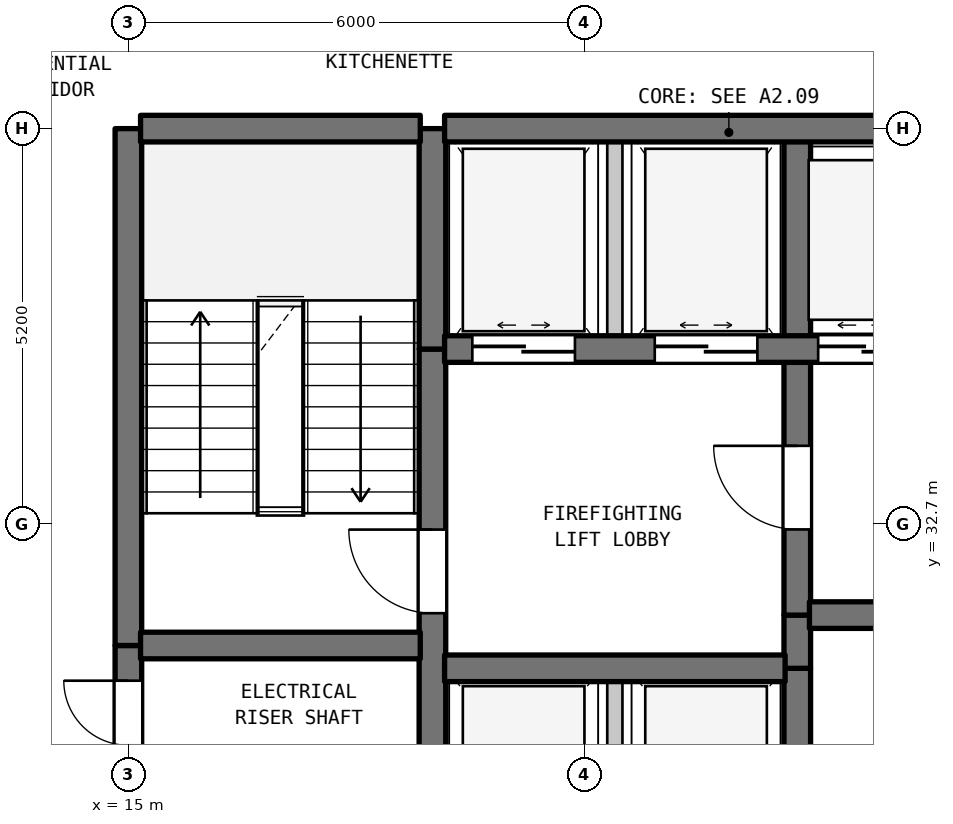
"""IFC4 building model, lengths in metres.
Left out: names, types, materials, properties, quantities, classifications, styles, units other than length and angle.
Written with IfcOpenShell. Run it as: python <this file> out.ifc"""

import sys

from ifc_helpers import new_model, si_unit, direction, frame, frame_2d, origin, place, context, subcontext, project, spatial, rectangle, extrude, element, fill, save


model = new_model("IFC4")
c1 = context("Model", 3, precision=1e-05, world=origin(), true_north=direction((0.0, 1.0)))
c2 = subcontext(c1, "Body", "Model", "MODEL_VIEW")
j1 = project(units=[si_unit("LENGTHUNIT", "METRE"), si_unit("PLANEANGLEUNIT", "RADIAN")], contexts=[c1])
p1 = place(None, origin())
s1 = spatial("IfcSite", under=j1, at=p1, CompositionType="ELEMENT")
p2 = place(p1, origin())
s2 = spatial("IfcBuilding", under=s1, at=p2, CompositionType="ELEMENT")
p3 = place(p2, frame((0.0, 0.0, 90.9)))
s3 = spatial("IfcBuildingStorey", under=s2, at=p3, CompositionType="ELEMENT", Elevation=90.9)
p4 = place(p3, frame((15.0, 29.5, 0.0), z_axis=(0.0, 0.0, 1.0), x_axis=(0.0, 1.0, 0.0)))
e1 = element("IfcWall", 1, at=p4, inside=s3, PredefinedType="SHEAR", context=c2, shape_type="SweptSolid", body=[
    extrude(rectangle(XDim=1.6, YDim=0.35, at=frame_2d((0.8, 0.0))), origin(), (0.0, 0.0, 1.0), 3.385),
])
p5 = place(p4, frame((0.287, 0.0, 0.0)))
e2 = element("IfcOpeningElement", 2, at=p5, cuts=e1, PredefinedType="OPENING", context=c2, shape_type="SweptSolid", body=[
    extrude(rectangle(XDim=0.85, YDim=2.1, at=frame_2d((0.425, 1.05))), frame((0.0, 0.185, 0.0), z_axis=(0.0, -1.0, 0.0), x_axis=(1.0, 0.0, 0.0)), (0.0, 0.0, 1.0), 0.37),
])
p6 = place(p3, frame((15.0, 31.1, 0.0), z_axis=(0.0, 0.0, 1.0), x_axis=(0.0, 1.0, 0.0)))
e3 = element("IfcWall", 3, at=p6, inside=s3, PredefinedType="SHEAR", context=c2, shape_type="SweptSolid", body=[
    extrude(rectangle(XDim=6.8, YDim=0.35, at=frame_2d((3.4, 0.0))), origin(), (0.0, 0.0, 1.0), 3.385),
])
p7 = place(p3, frame((19.0, 29.5, 0.0), z_axis=(0.0, 0.0, 1.0), x_axis=(0.0, 1.0, 0.0)))
e4 = element("IfcWall", 4, at=p7, inside=s3, PredefinedType="SHEAR", context=c2, shape_type="SweptSolid", body=[
    extrude(rectangle(XDim=5.5, YDim=0.35, at=frame_2d((2.75, 0.0))), origin(), (0.0, 0.0, 1.0), 3.385),
])
p8 = place(p7, frame((2.025, 0.0, 0.0)))
e5 = element("IfcOpeningElement", 5, at=p8, cuts=e4, PredefinedType="OPENING", context=c2, shape_type="SweptSolid", body=[
    extrude(rectangle(XDim=1.1, YDim=2.15, at=frame_2d((0.55, 1.075))), frame((0.0, 0.185, 0.0), z_axis=(0.0, -1.0, 0.0), x_axis=(1.0, 0.0, 0.0)), (0.0, 0.0, 1.0), 0.37),
])
p9 = place(p3, frame((19.0, 35.0, 0.0), z_axis=(0.0, 0.0, 1.0), x_axis=(0.0, 1.0, 0.0)))
e6 = element("IfcWall", 6, at=p9, inside=s3, PredefinedType="SHEAR", context=c2, shape_type="SweptSolid", body=[
    extrude(rectangle(XDim=2.9, YDim=0.35, at=frame_2d((1.45, 0.0))), origin(), (0.0, 0.0, 1.0), 3.385),
])
p10 = place(p3, frame((21.4, 28.2, 0.0), z_axis=(0.0, 0.0, 1.0), x_axis=(0.0, 1.0, 0.0)))
e7 = element("IfcWall", 7, at=p10, inside=s3, PredefinedType="STANDARD", context=c2, shape_type="SweptSolid", body=[
    extrude(rectangle(XDim=2.6, YDim=0.2, at=frame_2d((1.3, 0.0))), origin(), (0.0, 0.0, 1.0), 3.385),
])
p11 = place(p3, frame((21.4, 35.0, 0.0), z_axis=(0.0, 0.0, 1.0), x_axis=(0.0, 1.0, 0.0)))
e8 = element("IfcWall", 8, at=p11, inside=s3, PredefinedType="STANDARD", context=c2, shape_type="SweptSolid", body=[
    extrude(rectangle(XDim=2.9, YDim=0.2, at=frame_2d((1.45, 0.0))), origin(), (0.0, 0.0, 1.0), 3.385),
])
p12 = place(p3, frame((23.8, 29.5, 0.0), z_axis=(0.0, 0.0, 1.0), x_axis=(0.0, 1.0, 0.0)))
e9 = element("IfcWall", 9, at=p12, inside=s3, PredefinedType="SHEAR", context=c2, shape_type="SweptSolid", body=[
    extrude(rectangle(XDim=1.3, YDim=0.35, at=frame_2d((0.65, 0.0))), origin(), (0.0, 0.0, 1.0), 3.385),
])
p13 = place(p3, frame((23.8, 30.8, 0.0), z_axis=(0.0, 0.0, 1.0), x_axis=(0.0, 1.0, 0.0)))
e10 = element("IfcWall", 10, at=p13, inside=s3, PredefinedType="SHEAR", context=c2, shape_type="SweptSolid", body=[
    extrude(rectangle(XDim=0.7, YDim=0.35, at=frame_2d((0.35, 0.0))), origin(), (0.0, 0.0, 1.0), 3.385),
])
p14 = place(p3, frame((23.8, 31.5, 0.0), z_axis=(0.0, 0.0, 1.0), x_axis=(0.0, 1.0, 0.0)))
e11 = element("IfcWall", 11, at=p14, inside=s3, PredefinedType="SHEAR", context=c2, shape_type="SweptSolid", body=[
    extrude(rectangle(XDim=3.5, YDim=0.35, at=frame_2d((1.75, 0.0))), origin(), (0.0, 0.0, 1.0), 3.385),
])
p15 = place(p14, frame((1.127, 0.0, 0.0)))
e12 = element("IfcOpeningElement", 12, at=p15, cuts=e11, PredefinedType="OPENING", context=c2, shape_type="SweptSolid", body=[
    extrude(rectangle(XDim=1.1, YDim=2.15, at=frame_2d((0.55, 1.075))), frame((0.0, 0.185, 0.0), z_axis=(0.0, -1.0, 0.0), x_axis=(1.0, 0.0, 0.0)), (0.0, 0.0, 1.0), 0.37),
])
p16 = place(p3, frame((23.8, 35.0, 0.0), z_axis=(0.0, 0.0, 1.0), x_axis=(0.0, 1.0, 0.0)))
e13 = element("IfcWall", 13, at=p16, inside=s3, PredefinedType="SHEAR", context=c2, shape_type="SweptSolid", body=[
    extrude(rectangle(XDim=2.9, YDim=0.35, at=frame_2d((1.45, 0.0))), origin(), (0.0, 0.0, 1.0), 3.385),
])
p17 = place(p3, frame((19.16, 30.8, 0.0), z_axis=(0.0, 0.0, 1.0), x_axis=(1.0, 0.0, 0.0)))
e14 = element("IfcWall", 14, at=p17, inside=s3, PredefinedType="SHEAR", context=c2, shape_type="SweptSolid", body=[
    extrude(rectangle(XDim=4.48, YDim=0.35, at=frame_2d((2.24, 0.0))), origin(), (0.0, 0.0, 1.0), 3.385),
])
p18 = place(p3, frame((15.16, 31.1, 0.0), z_axis=(0.0, 0.0, 1.0), x_axis=(1.0, 0.0, 0.0)))
e15 = element("IfcWall", 15, at=p18, inside=s3, PredefinedType="SHEAR", context=c2, shape_type="SweptSolid", body=[
    extrude(rectangle(XDim=3.68, YDim=0.35, at=frame_2d((1.84, 0.0))), origin(), (0.0, 0.0, 1.0), 3.385),
])
p19 = place(p3, frame((23.96, 31.5, 0.0), z_axis=(0.0, 0.0, 1.0), x_axis=(1.0, 0.0, 0.0)))
e16 = element("IfcWall", 16, at=p19, inside=s3, PredefinedType="SHEAR", context=c2, shape_type="SweptSolid", body=[
    extrude(rectangle(XDim=3.18, YDim=0.35, at=frame_2d((1.59, 0.0))), origin(), (0.0, 0.0, 1.0), 3.385),
])
p20 = place(p19, frame((1.094, 0.0, 0.0)))
e17 = element("IfcOpeningElement", 17, at=p20, cuts=e16, PredefinedType="OPENING", context=c2, shape_type="SweptSolid", body=[
    extrude(rectangle(XDim=0.85, YDim=2.1, at=frame_2d((0.425, 1.05))), frame((0.0, 0.185, 0.0), z_axis=(0.0, -1.0, 0.0), x_axis=(1.0, 0.0, 0.0)), (0.0, 0.0, 1.0), 0.37),
])
p21 = place(p3, frame((19.16, 35.0, 0.0), z_axis=(0.0, 0.0, 1.0), x_axis=(1.0, 0.0, 0.0)))
e18 = element("IfcWall", 18, at=p21, inside=s3, PredefinedType="SHEAR", context=c2, shape_type="SweptSolid", body=[
    extrude(rectangle(XDim=11.48, YDim=0.35, at=frame_2d((5.74, 0.0))), origin(), (0.0, 0.0, 1.0), 3.385),
])
p22 = place(p21, frame((0.365, 0.0, 0.0)))
e19 = element("IfcOpeningElement", 19, at=p22, cuts=e18, PredefinedType="OPENING", context=c2, shape_type="SweptSolid", body=[
    extrude(rectangle(XDim=1.35, YDim=2.2, at=frame_2d((0.675, 1.1))), frame((0.0, 0.185, 0.0), z_axis=(0.0, -1.0, 0.0), x_axis=(1.0, 0.0, 0.0)), (0.0, 0.0, 1.0), 0.37),
])
p23 = place(p21, frame((2.765, 0.0, 0.0)))
e20 = element("IfcOpeningElement", 20, at=p23, cuts=e18, PredefinedType="OPENING", context=c2, shape_type="SweptSolid", body=[
    extrude(rectangle(XDim=1.35, YDim=2.2, at=frame_2d((0.675, 1.1))), frame((0.0, 0.185, 0.0), z_axis=(0.0, -1.0, 0.0), x_axis=(1.0, 0.0, 0.0)), (0.0, 0.0, 1.0), 0.37),
])
p24 = place(p21, frame((4.915, 0.0, 0.0)))
e21 = element("IfcOpeningElement", 21, at=p24, cuts=e18, PredefinedType="OPENING", context=c2, shape_type="SweptSolid", body=[
    extrude(rectangle(XDim=1.2, YDim=2.2, at=frame_2d((0.6, 1.1))), frame((0.0, 0.185, 0.0), z_axis=(0.0, -1.0, 0.0), x_axis=(1.0, 0.0, 0.0)), (0.0, 0.0, 1.0), 0.37),
])
p25 = place(p21, frame((6.665, 0.0, 0.0)))
e22 = element("IfcOpeningElement", 22, at=p25, cuts=e18, PredefinedType="OPENING", context=c2, shape_type="SweptSolid", body=[
    extrude(rectangle(XDim=1.2, YDim=2.2, at=frame_2d((0.6, 1.1))), frame((0.0, 0.185, 0.0), z_axis=(0.0, -1.0, 0.0), x_axis=(1.0, 0.0, 0.0)), (0.0, 0.0, 1.0), 0.37),
])
p26 = place(p21, frame((8.415, 0.0, 0.0)))
e23 = element("IfcOpeningElement", 23, at=p26, cuts=e18, PredefinedType="OPENING", context=c2, shape_type="SweptSolid", body=[
    extrude(rectangle(XDim=1.2, YDim=2.2, at=frame_2d((0.6, 1.1))), frame((0.0, 0.185, 0.0), z_axis=(0.0, -1.0, 0.0), x_axis=(1.0, 0.0, 0.0)), (0.0, 0.0, 1.0), 0.37),
])
p27 = place(p21, frame((10.16, 0.0, 0.0)))
e24 = element("IfcOpeningElement", 24, at=p27, cuts=e18, PredefinedType="OPENING", context=c2, shape_type="SweptSolid", body=[
    extrude(rectangle(XDim=1.2, YDim=2.2, at=frame_2d((0.6, 1.1))), frame((0.0, 0.185, 0.0), z_axis=(0.0, -1.0, 0.0), x_axis=(1.0, 0.0, 0.0)), (0.0, 0.0, 1.0), 0.37),
])
p28 = place(p3, frame((15.16, 37.9, 0.0), z_axis=(0.0, 0.0, 1.0), x_axis=(1.0, 0.0, 0.0)))
e25 = element("IfcWall", 25, at=p28, inside=s3, PredefinedType="SHEAR", context=c2, shape_type="SweptSolid", body=[
    extrude(rectangle(XDim=3.68, YDim=0.35, at=frame_2d((1.84, 0.0))), origin(), (0.0, 0.0, 1.0), 3.385),
])
p29 = place(p3, frame((19.16, 37.9, 0.0), z_axis=(0.0, 0.0, 1.0), x_axis=(1.0, 0.0, 0.0)))
e26 = element("IfcWall", 26, at=p29, inside=s3, PredefinedType="SHEAR", context=c2, shape_type="SweptSolid", body=[
    extrude(rectangle(XDim=11.48, YDim=0.35, at=frame_2d((5.74, 0.0))), origin(), (0.0, 0.0, 1.0), 3.385),
])
p30 = place(p5, origin())
e27 = element("IfcDoor", 27, at=p30, inside=s3, OperationType="SINGLE_SWING_RIGHT", PredefinedType="DOOR", context=c2, shape_type="SweptSolid", body=[
    extrude(rectangle(XDim=0.85, YDim=2.1, at=frame_2d((0.425, 1.05))), frame((0.0, 0.025, 0.0), z_axis=(0.0, -1.0, 0.0), x_axis=(1.0, 0.0, 0.0)), (0.0, 0.0, 1.0), 0.05),
])
fill(e2, e27)
p31 = place(p8, origin())
e28 = element("IfcDoor", 28, at=p31, inside=s3, OperationType="SINGLE_SWING_RIGHT", PredefinedType="DOOR", context=c2, shape_type="SweptSolid", body=[
    extrude(rectangle(XDim=1.1, YDim=2.15, at=frame_2d((0.55, 1.075))), frame((0.0, 0.025, 0.0), z_axis=(0.0, -1.0, 0.0), x_axis=(1.0, 0.0, 0.0)), (0.0, 0.0, 1.0), 0.05),
])
fill(e5, e28)
p32 = place(p15, origin())
e29 = element("IfcDoor", 29, at=p32, inside=s3, OperationType="SINGLE_SWING_RIGHT", PredefinedType="DOOR", context=c2, shape_type="SweptSolid", body=[
    extrude(rectangle(XDim=1.1, YDim=2.15, at=frame_2d((0.55, 1.075))), frame((0.0, 0.025, 0.0), z_axis=(0.0, -1.0, 0.0), x_axis=(1.0, 0.0, 0.0)), (0.0, 0.0, 1.0), 0.05),
])
fill(e12, e29)
p33 = place(p22, origin())
e30 = element("IfcDoor", 30, at=p33, inside=s3, OperationType="DOUBLE_DOOR_SLIDING", PredefinedType="DOOR", context=c2, shape_type="SweptSolid", body=[
    extrude(rectangle(XDim=1.35, YDim=2.2, at=frame_2d((0.675, 1.1))), frame((0.0, 0.025, 0.0), z_axis=(0.0, -1.0, 0.0), x_axis=(1.0, 0.0, 0.0)), (0.0, 0.0, 1.0), 0.05),
])
fill(e19, e30)
p34 = place(p23, origin())
e31 = element("IfcDoor", 31, at=p34, inside=s3, OperationType="DOUBLE_DOOR_SLIDING", PredefinedType="DOOR", context=c2, shape_type="SweptSolid", body=[
    extrude(rectangle(XDim=1.35, YDim=2.2, at=frame_2d((0.675, 1.1))), frame((0.0, 0.025, 0.0), z_axis=(0.0, -1.0, 0.0), x_axis=(1.0, 0.0, 0.0)), (0.0, 0.0, 1.0), 0.05),
])
fill(e20, e31)
p35 = place(p24, origin())
e32 = element("IfcDoor", 32, at=p35, inside=s3, OperationType="DOUBLE_DOOR_SLIDING", PredefinedType="DOOR", context=c2, shape_type="SweptSolid", body=[
    extrude(rectangle(XDim=1.2, YDim=2.2, at=frame_2d((0.6, 1.1))), frame((0.0, 0.025, 0.0), z_axis=(0.0, -1.0, 0.0), x_axis=(1.0, 0.0, 0.0)), (0.0, 0.0, 1.0), 0.05),
])
fill(e21, e32)
save(model, sys.argv[1])
